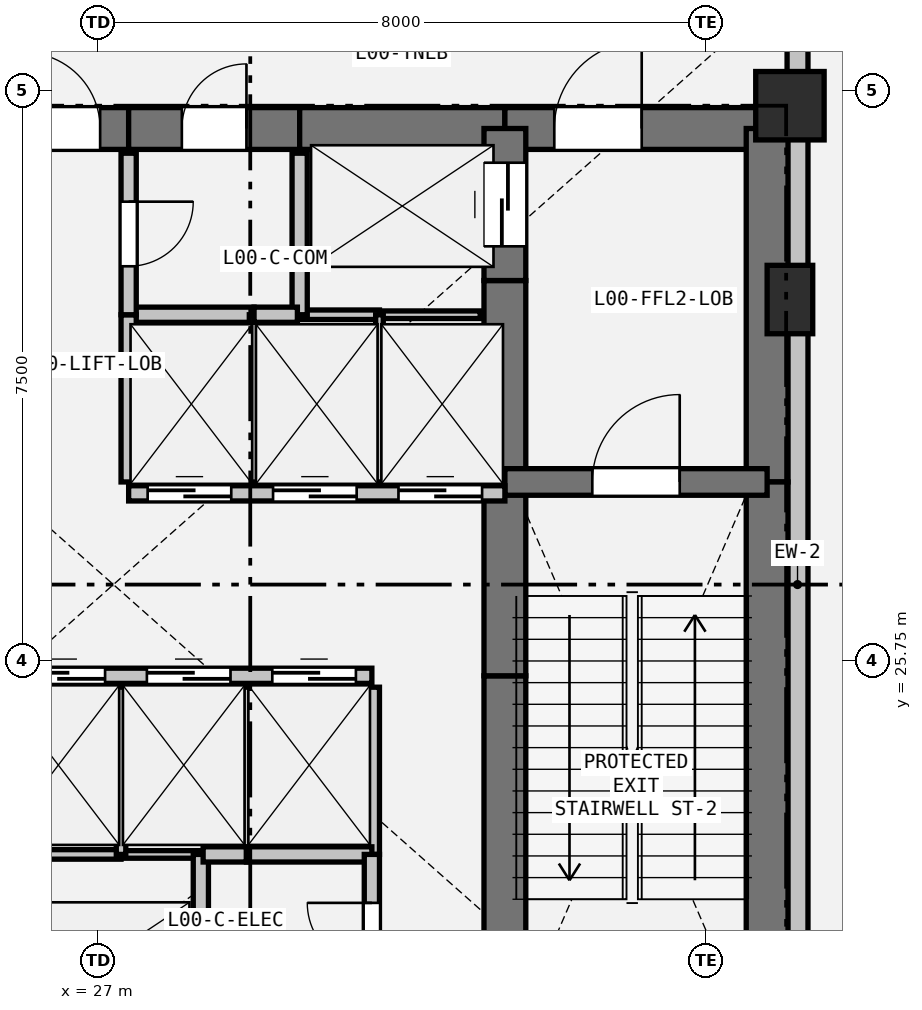
"""IFC4 building model, lengths in metres.
Left out: names, types, materials, properties, quantities, classifications, styles, units other than length and angle.
Written with IfcOpenShell. Run it as: python <this file> out.ifc"""

import sys

from ifc_helpers import new_model, si_unit, direction, frame, frame_2d, origin, origin_2d, place, context, subcontext, project, spatial, rectangle, extrude, element, fill, save


model = new_model("IFC4")
c1 = context("Model", 3, precision=1e-05, world=origin(), true_north=direction((0.0, 1.0)))
c2 = subcontext(c1, "Body", "Model", "MODEL_VIEW")
j1 = project(units=[si_unit("LENGTHUNIT", "METRE"), si_unit("PLANEANGLEUNIT", "RADIAN")], contexts=[c1])
p1 = place(None, origin())
s1 = spatial("IfcSite", under=j1, at=p1, CompositionType="ELEMENT")
p2 = place(p1, origin())
s2 = spatial("IfcBuilding", under=s1, at=p2, CompositionType="ELEMENT")
p3 = place(p2, origin())
s3 = spatial("IfcBuildingStorey", under=s2, at=p3, CompositionType="ELEMENT", Elevation=0.0)
p4 = place(p3, frame((36.1, 33.05, 0.0), z_axis=(0.0, 0.0, 1.0), x_axis=(1.0, 0.0, 0.0)))
e1 = element("IfcColumn", 1, at=p4, inside=s3, PredefinedType="COLUMN", context=c2, shape_type="SweptSolid", body=[
    extrude(rectangle(XDim=0.9, YDim=0.9, at=origin_2d()), origin(), (0.0, 0.0, 1.0), 5.1),
])
p5 = place(p3, frame((36.1, 30.5, 0.0), z_axis=(0.0, 0.0, 1.0), x_axis=(1.0, 0.0, 0.0)))
e2 = element("IfcColumn", 2, at=p5, inside=s3, PredefinedType="PILASTER", context=c2, shape_type="SweptSolid", body=[
    extrude(rectangle(XDim=0.6, YDim=0.9, at=origin_2d()), origin(), (0.0, 0.0, 1.0), 5.1),
])
p6 = place(p3, frame((36.2, 34.7, 0.0), z_axis=(0.0, 0.0, 1.0), x_axis=(0.0, -1.0, 0.0)))
e3 = element("IfcWall", 3, at=p6, inside=s3, PredefinedType="SOLIDWALL", context=c2, shape_type="SweptSolid", body=[
    extrude(rectangle(XDim=15.9, YDim=0.275, at=frame_2d((7.95, 0.0))), origin(), (0.0, 0.0, 1.0), 3.185),
])
p7 = place(p3, frame((25.65, 32.75, 0.0), z_axis=(0.0, 0.0, 1.0), x_axis=(1.0, 0.0, 0.0)))
e4 = element("IfcWall", 4, at=p7, inside=s3, PredefinedType="SHEAR", context=c2, shape_type="SweptSolid", body=[
    extrude(rectangle(XDim=1.75, YDim=0.55, at=frame_2d((0.875, 0.0))), origin(), (0.0, 0.0, 1.0), 4.8),
])
p8 = place(p7, frame((0.375, 0.0, 0.0)))
e5 = element("IfcOpeningElement", 5, at=p8, cuts=e4, PredefinedType="OPENING", context=c2, shape_type="SweptSolid", body=[
    extrude(rectangle(XDim=1.0, YDim=2.15, at=frame_2d((0.5, 1.075))), frame((0.0, 0.285, 0.0), z_axis=(0.0, -1.0, 0.0), x_axis=(1.0, 0.0, 0.0)), (0.0, 0.0, 1.0), 0.57),
])
p9 = place(p3, frame((27.4, 32.75, 0.0), z_axis=(0.0, 0.0, 1.0), x_axis=(1.0, 0.0, 0.0)))
e6 = element("IfcWall", 6, at=p9, inside=s3, PredefinedType="SHEAR", context=c2, shape_type="SweptSolid", body=[
    extrude(rectangle(XDim=2.25, YDim=0.55, at=frame_2d((1.125, 0.0))), origin(), (0.0, 0.0, 1.0), 4.8),
])
p10 = place(p9, frame((0.7, 0.0, 0.0)))
e7 = element("IfcOpeningElement", 7, at=p10, cuts=e6, PredefinedType="OPENING", context=c2, shape_type="SweptSolid", body=[
    extrude(rectangle(XDim=0.85, YDim=2.1, at=frame_2d((0.425, 1.05))), frame((0.0, 0.285, 0.0), z_axis=(0.0, -1.0, 0.0), x_axis=(1.0, 0.0, 0.0)), (0.0, 0.0, 1.0), 0.57),
])
p11 = place(p3, frame((29.65, 32.75, 0.0), z_axis=(0.0, 0.0, 1.0), x_axis=(1.0, 0.0, 0.0)))
e8 = element("IfcWall", 8, at=p11, inside=s3, PredefinedType="SHEAR", context=c2, shape_type="SweptSolid", body=[
    extrude(rectangle(XDim=2.7, YDim=0.55, at=frame_2d((1.35, 0.0))), origin(), (0.0, 0.0, 1.0), 4.8),
])
p12 = place(p3, frame((32.35, 32.75, 0.0), z_axis=(0.0, 0.0, 1.0), x_axis=(1.0, 0.0, 0.0)))
e9 = element("IfcWall", 9, at=p12, inside=s3, PredefinedType="SHEAR", context=c2, shape_type="SweptSolid", body=[
    extrude(rectangle(XDim=3.45, YDim=0.55, at=frame_2d((1.725, 0.0))), origin(), (0.0, 0.0, 1.0), 4.8),
])
p13 = place(p12, frame((0.65, 0.0, 0.0)))
e10 = element("IfcOpeningElement", 10, at=p13, cuts=e9, PredefinedType="OPENING", context=c2, shape_type="SweptSolid", body=[
    extrude(rectangle(XDim=1.15, YDim=2.15, at=frame_2d((0.575, 1.075))), frame((0.0, 0.285, 0.0), z_axis=(0.0, -1.0, 0.0), x_axis=(1.0, 0.0, 0.0)), (0.0, 0.0, 1.0), 0.57),
])
p14 = place(p3, frame((35.8, 32.75, 0.0), z_axis=(0.0, 0.0, 1.0), x_axis=(0.0, -1.0, 0.0)))
e11 = element("IfcWall", 11, at=p14, inside=s3, PredefinedType="SHEAR", context=c2, shape_type="SweptSolid", body=[
    extrude(rectangle(XDim=4.65, YDim=0.55, at=frame_2d((2.325, 0.0))), origin(), (0.0, 0.0, 1.0), 4.8),
])
p15 = place(p3, frame((35.8, 28.1, 0.0), z_axis=(0.0, 0.0, 1.0), x_axis=(0.0, -1.0, 0.0)))
e12 = element("IfcWall", 12, at=p15, inside=s3, PredefinedType="SHEAR", context=c2, shape_type="SweptSolid", body=[
    extrude(rectangle(XDim=7.35, YDim=0.55, at=frame_2d((3.675, 0.0))), origin(), (0.0, 0.0, 1.0), 4.8),
])
p16 = place(p3, frame((32.35, 20.75, 0.0), z_axis=(0.0, 0.0, 1.0), x_axis=(0.0, 1.0, 0.0)))
e13 = element("IfcWall", 13, at=p16, inside=s3, PredefinedType="SHEAR", context=c2, shape_type="SweptSolid", body=[
    extrude(rectangle(XDim=4.8, YDim=0.55, at=frame_2d((2.4, 0.0))), origin(), (0.0, 0.0, 1.0), 4.8),
])
p17 = place(p3, frame((32.35, 25.55, 0.0), z_axis=(0.0, 0.0, 1.0), x_axis=(0.0, 1.0, 0.0)))
e14 = element("IfcWall", 14, at=p17, inside=s3, PredefinedType="SHEAR", context=c2, shape_type="SweptSolid", body=[
    extrude(rectangle(XDim=2.4, YDim=0.55, at=frame_2d((1.2, 0.0))), origin(), (0.0, 0.0, 1.0), 4.8),
])
p18 = place(p3, frame((32.35, 27.95, 0.0), z_axis=(0.0, 0.0, 1.0), x_axis=(0.0, 1.0, 0.0)))
e15 = element("IfcWall", 15, at=p18, inside=s3, PredefinedType="SHEAR", context=c2, shape_type="SweptSolid", body=[
    extrude(rectangle(XDim=2.8, YDim=0.55, at=frame_2d((1.4, 0.0))), origin(), (0.0, 0.0, 1.0), 4.8),
])
p19 = place(p3, frame((32.35, 30.75, 0.0), z_axis=(0.0, 0.0, 1.0), x_axis=(0.0, 1.0, 0.0)))
e16 = element("IfcWall", 16, at=p19, inside=s3, PredefinedType="SHEAR", context=c2, shape_type="SweptSolid", body=[
    extrude(rectangle(XDim=2.0, YDim=0.55, at=frame_2d((1.0, 0.0))), origin(), (0.0, 0.0, 1.0), 4.8),
])
p20 = place(p19, frame((0.45, 0.0, 0.0)))
e17 = element("IfcOpeningElement", 17, at=p20, cuts=e16, PredefinedType="OPENING", context=c2, shape_type="SweptSolid", body=[
    extrude(rectangle(XDim=1.1, YDim=2.15, at=frame_2d((0.55, 1.075))), frame((0.0, 0.285, 0.0), z_axis=(0.0, -1.0, 0.0), x_axis=(1.0, 0.0, 0.0)), (0.0, 0.0, 1.0), 0.57),
])
p21 = place(p3, frame((32.35, 28.1, 0.0), z_axis=(0.0, 0.0, 1.0), x_axis=(1.0, 0.0, 0.0)))
e18 = element("IfcWall", 18, at=p21, inside=s3, PredefinedType="SHEAR", context=c2, shape_type="SweptSolid", body=[
    extrude(rectangle(XDim=3.45, YDim=0.35, at=frame_2d((1.725, 0.0))), origin(), (0.0, 0.0, 1.0), 4.8),
])
p22 = place(p21, frame((1.15, 0.0, 0.0)))
e19 = element("IfcOpeningElement", 19, at=p22, cuts=e18, PredefinedType="OPENING", context=c2, shape_type="SweptSolid", body=[
    extrude(rectangle(XDim=1.15, YDim=2.15, at=frame_2d((0.575, 1.075))), frame((0.0, 0.185, 0.0), z_axis=(0.0, -1.0, 0.0), x_axis=(1.0, 0.0, 0.0)), (0.0, 0.0, 1.0), 0.37),
])
p23 = place(p3, frame((25.65, 25.55, 0.0), z_axis=(0.0, 0.0, 1.0), x_axis=(1.0, 0.0, 0.0)))
e20 = element("IfcWall", 20, at=p23, inside=s3, PredefinedType="PARTITIONING", context=c2, shape_type="SweptSolid", body=[
    extrude(rectangle(XDim=4.95, YDim=0.2, at=frame_2d((2.475, 0.0))), origin(), (0.0, 0.0, 1.0), 4.8),
])
p24 = place(p23, frame((0.34, 0.0, 0.0)))
e21 = element("IfcOpeningElement", 21, at=p24, cuts=e20, PredefinedType="OPENING", context=c2, shape_type="SweptSolid", body=[
    extrude(rectangle(XDim=1.1, YDim=2.15, at=frame_2d((0.55, 1.075))), frame((0.0, 0.11, 0.0), z_axis=(0.0, -1.0, 0.0), x_axis=(1.0, 0.0, 0.0)), (0.0, 0.0, 1.0), 0.22),
])
p25 = place(p23, frame((1.99, 0.0, 0.0)))
e22 = element("IfcOpeningElement", 22, at=p25, cuts=e20, PredefinedType="OPENING", context=c2, shape_type="SweptSolid", body=[
    extrude(rectangle(XDim=1.1, YDim=2.15, at=frame_2d((0.55, 1.075))), frame((0.0, 0.11, 0.0), z_axis=(0.0, -1.0, 0.0), x_axis=(1.0, 0.0, 0.0)), (0.0, 0.0, 1.0), 0.22),
])
p26 = place(p23, frame((3.64, 0.0, 0.0)))
e23 = element("IfcOpeningElement", 23, at=p26, cuts=e20, PredefinedType="OPENING", context=c2, shape_type="SweptSolid", body=[
    extrude(rectangle(XDim=1.1, YDim=2.15, at=frame_2d((0.55, 1.075))), frame((0.0, 0.11, 0.0), z_axis=(0.0, -1.0, 0.0), x_axis=(1.0, 0.0, 0.0)), (0.0, 0.0, 1.0), 0.22),
])
p27 = place(p3, frame((27.4, 27.95, 0.0), z_axis=(0.0, 0.0, 1.0), x_axis=(1.0, 0.0, 0.0)))
e24 = element("IfcWall", 24, at=p27, inside=s3, PredefinedType="PARTITIONING", context=c2, shape_type="SweptSolid", body=[
    extrude(rectangle(XDim=4.95, YDim=0.2, at=frame_2d((2.475, 0.0))), origin(), (0.0, 0.0, 1.0), 4.8),
])
p28 = place(p27, frame((0.25, 0.0, 0.0)))
e25 = element("IfcOpeningElement", 25, at=p28, cuts=e24, PredefinedType="OPENING", context=c2, shape_type="SweptSolid", body=[
    extrude(rectangle(XDim=1.1, YDim=2.15, at=frame_2d((0.55, 1.075))), frame((0.0, 0.11, 0.0), z_axis=(0.0, -1.0, 0.0), x_axis=(1.0, 0.0, 0.0)), (0.0, 0.0, 1.0), 0.22),
])
p29 = place(p27, frame((1.9, 0.0, 0.0)))
e26 = element("IfcOpeningElement", 26, at=p29, cuts=e24, PredefinedType="OPENING", context=c2, shape_type="SweptSolid", body=[
    extrude(rectangle(XDim=1.1, YDim=2.15, at=frame_2d((0.55, 1.075))), frame((0.0, 0.11, 0.0), z_axis=(0.0, -1.0, 0.0), x_axis=(1.0, 0.0, 0.0)), (0.0, 0.0, 1.0), 0.22),
])
p30 = place(p27, frame((3.55, 0.0, 0.0)))
e27 = element("IfcOpeningElement", 27, at=p30, cuts=e24, PredefinedType="OPENING", context=c2, shape_type="SweptSolid", body=[
    extrude(rectangle(XDim=1.1, YDim=2.15, at=frame_2d((0.55, 1.075))), frame((0.0, 0.11, 0.0), z_axis=(0.0, -1.0, 0.0), x_axis=(1.0, 0.0, 0.0)), (0.0, 0.0, 1.0), 0.22),
])
p31 = place(p3, frame((25.975, 23.2, 0.0), z_axis=(0.0, 0.0, 1.0), x_axis=(1.0, 0.0, 0.0)))
e28 = element("IfcWall", 28, at=p31, inside=s3, PredefinedType="PARTITIONING", context=c2, shape_type="SweptSolid", body=[
    extrude(rectangle(XDim=1.325, YDim=0.125, at=frame_2d((0.663, 0.0))), origin(), (0.0, 0.0, 1.0), 4.8),
])
p32 = place(p3, frame((27.3, 23.2, 0.0), z_axis=(0.0, 0.0, 1.0), x_axis=(1.0, 0.0, 0.0)))
e29 = element("IfcWall", 29, at=p32, inside=s3, PredefinedType="PARTITIONING", context=c2, shape_type="SweptSolid", body=[
    extrude(rectangle(XDim=1.05, YDim=0.1, at=frame_2d((0.525, 0.0))), origin(), (0.0, 0.0, 1.0), 4.8),
])
p33 = place(p3, frame((28.35, 23.2, 0.0), z_axis=(0.0, 0.0, 1.0), x_axis=(0.0, -1.0, 0.0)))
e30 = element("IfcWall", 30, at=p33, inside=s3, PredefinedType="PARTITIONING", context=c2, shape_type="SweptSolid", body=[
    extrude(rectangle(XDim=2.125, YDim=0.2, at=frame_2d((1.062, 0.0))), origin(), (0.0, 0.0, 1.0), 4.8),
])
p34 = place(p3, frame((32.025, 30.3, 0.0), z_axis=(0.0, 0.0, 1.0), x_axis=(-1.0, 0.0, 0.0)))
e31 = element("IfcWall", 31, at=p34, inside=s3, PredefinedType="PARTITIONING", context=c2, shape_type="SweptSolid", body=[
    extrude(rectangle(XDim=1.325, YDim=0.1, at=frame_2d((0.663, 0.0))), origin(), (0.0, 0.0, 1.0), 4.8),
])
p35 = place(p3, frame((30.7, 30.3, 0.0), z_axis=(0.0, 0.0, 1.0), x_axis=(-1.0, 0.0, 0.0)))
e32 = element("IfcWall", 32, at=p35, inside=s3, PredefinedType="PARTITIONING", context=c2, shape_type="SweptSolid", body=[
    extrude(rectangle(XDim=1.05, YDim=0.125, at=frame_2d((0.525, 0.0))), origin(), (0.0, 0.0, 1.0), 4.8),
])
p36 = place(p3, frame((29.65, 30.3, 0.0), z_axis=(0.0, 0.0, 1.0), x_axis=(0.0, 1.0, 0.0)))
e33 = element("IfcWall", 33, at=p36, inside=s3, PredefinedType="PARTITIONING", context=c2, shape_type="SweptSolid", body=[
    extrude(rectangle(XDim=2.125, YDim=0.2, at=frame_2d((1.062, 0.0))), origin(), (0.0, 0.0, 1.0), 4.8),
])
p37 = place(p3, frame((27.3, 25.4, 0.0), z_axis=(0.0, 0.0, 1.0), x_axis=(0.0, -1.0, 0.0)))
e34 = element("IfcWall", 34, at=p37, inside=s3, PredefinedType="PARTITIONING", context=c2, shape_type="SweptSolid", body=[
    extrude(rectangle(XDim=2.2, YDim=0.125, at=frame_2d((1.1, 0.0))), origin(), (0.0, 0.0, 1.0), 4.8),
])
p38 = place(p3, frame((28.95, 25.4, 0.0), z_axis=(0.0, 0.0, 1.0), x_axis=(0.0, -1.0, 0.0)))
e35 = element("IfcWall", 35, at=p38, inside=s3, PredefinedType="PARTITIONING", context=c2, shape_type="SweptSolid", body=[
    extrude(rectangle(XDim=2.2, YDim=0.1, at=frame_2d((1.1, 0.0))), origin(), (0.0, 0.0, 1.0), 4.8),
])
p39 = place(p3, frame((28.95, 23.2, 0.0), z_axis=(0.0, 0.0, 1.0), x_axis=(-1.0, 0.0, 0.0)))
e36 = element("IfcWall", 36, at=p39, inside=s3, PredefinedType="PARTITIONING", context=c2, shape_type="SweptSolid", body=[
    extrude(rectangle(XDim=0.57, YDim=0.2, at=frame_2d((0.285, 0.0))), origin(), (0.0, 0.0, 1.0), 4.8),
])
p40 = place(p3, frame((30.6, 25.4, 0.0), z_axis=(0.0, 0.0, 1.0), x_axis=(0.0, -1.0, 0.0)))
e37 = element("IfcWall", 37, at=p40, inside=s3, PredefinedType="PARTITIONING", context=c2, shape_type="SweptSolid", body=[
    extrude(rectangle(XDim=2.2, YDim=0.2, at=frame_2d((1.1, 0.0))), origin(), (0.0, 0.0, 1.0), 4.8),
])
for number, where, z_axis, x_axis in (
    (38, (30.6, 23.2, 0.0), (0.0, 0.0, 1.0), (-1.0, 0.0, 0.0)),
    (39, (27.4, 30.3, 0.0), (0.0, 0.0, 1.0), (1.0, 0.0, 0.0)),
):
    element("IfcWall", number, at=place(p3, frame(where, z_axis=z_axis, x_axis=x_axis)), inside=s3, PredefinedType="PARTITIONING", context=c2, shape_type="SweptSolid", body=[
        extrude(rectangle(XDim=1.65, YDim=0.2, at=frame_2d((0.825, 0.0))), origin(), (0.0, 0.0, 1.0), 4.8),
    ])
p41 = place(p3, frame((29.05, 30.3, 0.0), z_axis=(0.0, 0.0, 1.0), x_axis=(0.0, -1.0, 0.0)))
e40 = element("IfcWall", 40, at=p41, inside=s3, PredefinedType="PARTITIONING", context=c2, shape_type="SweptSolid", body=[
    extrude(rectangle(XDim=2.2, YDim=0.125, at=frame_2d((1.1, 0.0))), origin(), (0.0, 0.0, 1.0), 4.8),
])
p42 = place(p3, frame((27.4, 28.1, 0.0), z_axis=(0.0, 0.0, 1.0), x_axis=(0.0, 1.0, 0.0)))
e41 = element("IfcWall", 41, at=p42, inside=s3, PredefinedType="PARTITIONING", context=c2, shape_type="SweptSolid", body=[
    extrude(rectangle(XDim=2.2, YDim=0.2, at=frame_2d((1.1, 0.0))), origin(), (0.0, 0.0, 1.0), 4.8),
])
p43 = place(p3, frame((29.05, 30.3, 0.0), z_axis=(0.0, 0.0, 1.0), x_axis=(1.0, 0.0, 0.0)))
e42 = element("IfcWall", 42, at=p43, inside=s3, PredefinedType="PARTITIONING", context=c2, shape_type="SweptSolid", body=[
    extrude(rectangle(XDim=0.57, YDim=0.2, at=frame_2d((0.285, 0.0))), origin(), (0.0, 0.0, 1.0), 4.8),
])
p44 = place(p3, frame((30.7, 30.3, 0.0), z_axis=(0.0, 0.0, 1.0), x_axis=(0.0, -1.0, 0.0)))
e43 = element("IfcWall", 43, at=p44, inside=s3, PredefinedType="PARTITIONING", context=c2, shape_type="SweptSolid", body=[
    extrude(rectangle(XDim=2.2, YDim=0.1, at=frame_2d((1.1, 0.0))), origin(), (0.0, 0.0, 1.0), 4.8),
])
p45 = place(p3, frame((30.6, 21.075, 0.0), z_axis=(0.0, 0.0, 1.0), x_axis=(0.0, 1.0, 0.0)))
e44 = element("IfcWall", 44, at=p45, inside=s3, PredefinedType="PARTITIONING", context=c2, shape_type="SweptSolid", body=[
    extrude(rectangle(XDim=2.125, YDim=0.2, at=frame_2d((1.062, 0.0))), origin(), (0.0, 0.0, 1.0), 4.8),
])
p46 = place(p45, frame((0.637, 0.0, 0.0)))
e45 = element("IfcOpeningElement", 45, at=p46, cuts=e44, PredefinedType="OPENING", context=c2, shape_type="SweptSolid", body=[
    extrude(rectangle(XDim=0.85, YDim=2.1, at=frame_2d((0.425, 1.05))), frame((0.0, 0.11, 0.0), z_axis=(0.0, -1.0, 0.0), x_axis=(1.0, 0.0, 0.0)), (0.0, 0.0, 1.0), 0.22),
])
p47 = place(p3, frame((27.4, 32.425, 0.0), z_axis=(0.0, 0.0, 1.0), x_axis=(0.0, -1.0, 0.0)))
e46 = element("IfcWall", 46, at=p47, inside=s3, PredefinedType="PARTITIONING", context=c2, shape_type="SweptSolid", body=[
    extrude(rectangle(XDim=2.125, YDim=0.2, at=frame_2d((1.062, 0.0))), origin(), (0.0, 0.0, 1.0), 4.8),
])
p48 = place(p47, frame((0.637, 0.0, 0.0)))
e47 = element("IfcOpeningElement", 47, at=p48, cuts=e46, PredefinedType="OPENING", context=c2, shape_type="SweptSolid", body=[
    extrude(rectangle(XDim=0.85, YDim=2.1, at=frame_2d((0.425, 1.05))), frame((0.0, 0.11, 0.0), z_axis=(0.0, -1.0, 0.0), x_axis=(1.0, 0.0, 0.0)), (0.0, 0.0, 1.0), 0.22),
])
p49 = place(p24, origin())
e48 = element("IfcDoor", 48, at=p49, inside=s3, OperationType="SLIDING_TO_LEFT", PredefinedType="DOOR", context=c2, shape_type="SweptSolid", body=[
    extrude(rectangle(XDim=1.1, YDim=2.15, at=frame_2d((0.55, 1.075))), frame((0.0, 0.025, 0.0), z_axis=(0.0, -1.0, 0.0), x_axis=(1.0, 0.0, 0.0)), (0.0, 0.0, 1.0), 0.05),
])
fill(e21, e48)
p50 = place(p25, origin())
e49 = element("IfcDoor", 49, at=p50, inside=s3, OperationType="SLIDING_TO_LEFT", PredefinedType="DOOR", context=c2, shape_type="SweptSolid", body=[
    extrude(rectangle(XDim=1.1, YDim=2.15, at=frame_2d((0.55, 1.075))), frame((0.0, 0.025, 0.0), z_axis=(0.0, -1.0, 0.0), x_axis=(1.0, 0.0, 0.0)), (0.0, 0.0, 1.0), 0.05),
])
fill(e22, e49)
p51 = place(p26, origin())
e50 = element("IfcDoor", 50, at=p51, inside=s3, OperationType="SLIDING_TO_LEFT", PredefinedType="DOOR", context=c2, shape_type="SweptSolid", body=[
    extrude(rectangle(XDim=1.1, YDim=2.15, at=frame_2d((0.55, 1.075))), frame((0.0, 0.025, 0.0), z_axis=(0.0, -1.0, 0.0), x_axis=(1.0, 0.0, 0.0)), (0.0, 0.0, 1.0), 0.05),
])
fill(e23, e50)
p52 = place(p28, origin())
e51 = element("IfcDoor", 51, at=p52, inside=s3, OperationType="SLIDING_TO_LEFT", PredefinedType="DOOR", context=c2, shape_type="SweptSolid", body=[
    extrude(rectangle(XDim=1.1, YDim=2.15, at=frame_2d((0.55, 1.075))), frame((0.0, 0.025, 0.0), z_axis=(0.0, -1.0, 0.0), x_axis=(1.0, 0.0, 0.0)), (0.0, 0.0, 1.0), 0.05),
])
fill(e25, e51)
p53 = place(p29, origin())
e52 = element("IfcDoor", 52, at=p53, inside=s3, OperationType="SLIDING_TO_LEFT", PredefinedType="DOOR", context=c2, shape_type="SweptSolid", body=[
    extrude(rectangle(XDim=1.1, YDim=2.15, at=frame_2d((0.55, 1.075))), frame((0.0, 0.025, 0.0), z_axis=(0.0, -1.0, 0.0), x_axis=(1.0, 0.0, 0.0)), (0.0, 0.0, 1.0), 0.05),
])
fill(e26, e52)
p54 = place(p30, origin())
e53 = element("IfcDoor", 53, at=p54, inside=s3, OperationType="SLIDING_TO_LEFT", PredefinedType="DOOR", context=c2, shape_type="SweptSolid", body=[
    extrude(rectangle(XDim=1.1, YDim=2.15, at=frame_2d((0.55, 1.075))), frame((0.0, 0.025, 0.0), z_axis=(0.0, -1.0, 0.0), x_axis=(1.0, 0.0, 0.0)), (0.0, 0.0, 1.0), 0.05),
])
fill(e27, e53)
p55 = place(p8, origin())
e54 = element("IfcDoor", 54, at=p55, inside=s3, OperationType="SINGLE_SWING_LEFT", PredefinedType="DOOR", context=c2, shape_type="SweptSolid", body=[
    extrude(rectangle(XDim=1.0, YDim=2.15, at=frame_2d((0.5, 1.075))), frame((0.0, 0.025, 0.0), z_axis=(0.0, -1.0, 0.0), x_axis=(1.0, 0.0, 0.0)), (0.0, 0.0, 1.0), 0.05),
])
fill(e5, e54)
p56 = place(p20, origin())
e55 = element("IfcDoor", 55, at=p56, inside=s3, OperationType="SLIDING_TO_LEFT", PredefinedType="DOOR", context=c2, shape_type="SweptSolid", body=[
    extrude(rectangle(XDim=1.1, YDim=2.15, at=frame_2d((0.55, 1.075))), frame((0.0, 0.025, 0.0), z_axis=(0.0, -1.0, 0.0), x_axis=(1.0, 0.0, 0.0)), (0.0, 0.0, 1.0), 0.05),
])
fill(e17, e55)
p57 = place(p22, origin())
e56 = element("IfcDoor", 56, at=p57, inside=s3, OperationType="SINGLE_SWING_RIGHT", PredefinedType="DOOR", context=c2, shape_type="SweptSolid", body=[
    extrude(rectangle(XDim=1.15, YDim=2.15, at=frame_2d((0.575, 1.075))), frame((0.0, 0.025, 0.0), z_axis=(0.0, -1.0, 0.0), x_axis=(1.0, 0.0, 0.0)), (0.0, 0.0, 1.0), 0.05),
])
fill(e19, e56)
p58 = place(p13, origin())
e57 = element("IfcDoor", 57, at=p58, inside=s3, OperationType="SINGLE_SWING_RIGHT", PredefinedType="DOOR", context=c2, shape_type="SweptSolid", body=[
    extrude(rectangle(XDim=1.15, YDim=2.15, at=frame_2d((0.575, 1.075))), frame((0.0, 0.025, 0.0), z_axis=(0.0, -1.0, 0.0), x_axis=(1.0, 0.0, 0.0)), (0.0, 0.0, 1.0), 0.05),
])
fill(e10, e57)
p59 = place(p46, origin())
e58 = element("IfcDoor", 58, at=p59, inside=s3, OperationType="SINGLE_SWING_RIGHT", PredefinedType="DOOR", context=c2, shape_type="SweptSolid", body=[
    extrude(rectangle(XDim=0.85, YDim=2.1, at=frame_2d((0.425, 1.05))), frame((0.0, 0.025, 0.0), z_axis=(0.0, -1.0, 0.0), x_axis=(1.0, 0.0, 0.0)), (0.0, 0.0, 1.0), 0.05),
])
fill(e45, e58)
p60 = place(p48, origin())
e59 = element("IfcDoor", 59, at=p60, inside=s3, OperationType="SINGLE_SWING_LEFT", PredefinedType="DOOR", context=c2, shape_type="SweptSolid", body=[
    extrude(rectangle(XDim=0.85, YDim=2.1, at=frame_2d((0.425, 1.05))), frame((0.0, 0.025, 0.0), z_axis=(0.0, -1.0, 0.0), x_axis=(1.0, 0.0, 0.0)), (0.0, 0.0, 1.0), 0.05),
])
fill(e47, e59)
p61 = place(p10, origin())
e60 = element("IfcDoor", 60, at=p61, inside=s3, OperationType="SINGLE_SWING_RIGHT", PredefinedType="DOOR", context=c2, shape_type="SweptSolid", body=[
    extrude(rectangle(XDim=0.85, YDim=2.1, at=frame_2d((0.425, 1.05))), frame((0.0, 0.025, 0.0), z_axis=(0.0, -1.0, 0.0), x_axis=(1.0, 0.0, 0.0)), (0.0, 0.0, 1.0), 0.05),
])
fill(e7, e60)
save(model, sys.argv[1])
